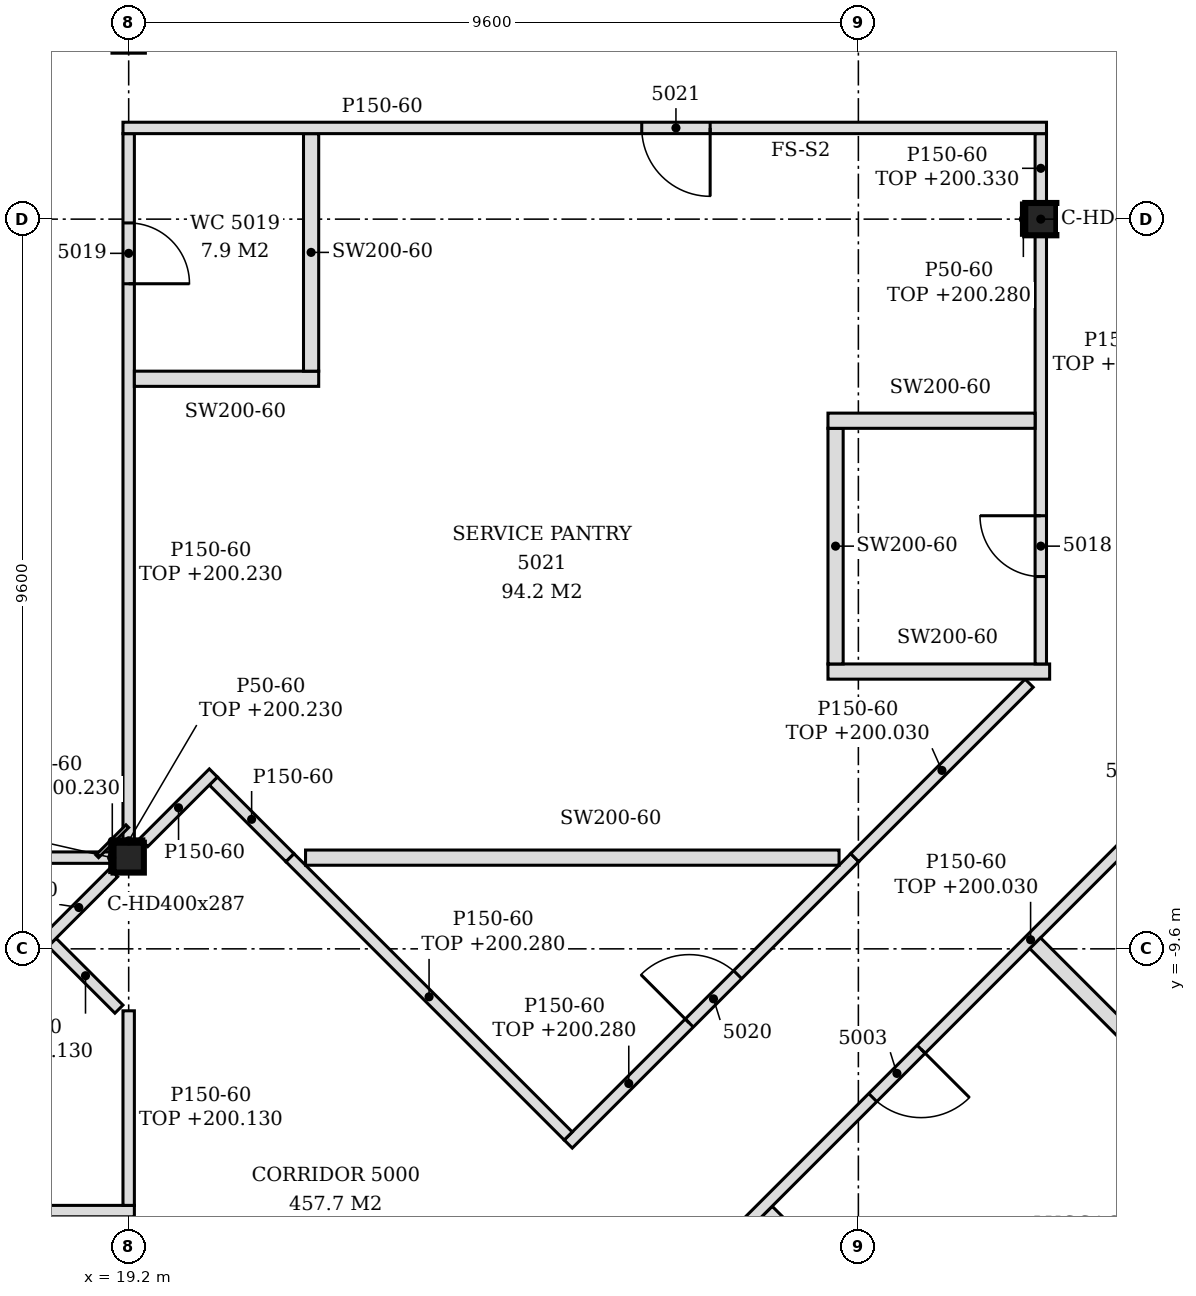
"""IFC4 building model, lengths in metres.
Left out: names, types, materials, properties, quantities, classifications, styles, units other than length and angle.
Written with IfcOpenShell. Run it as: python <this file> out.ifc"""

import sys

from ifc_helpers import new_model, si_unit, direction, frame, frame_2d, origin, origin_2d, place, context, subcontext, project, spatial, polyline, rectangle, i_section, outline, extrude, element, fill, save


model = new_model("IFC4")
c1 = context("Model", 3, precision=1e-05, world=origin(), true_north=direction((0.0, 1.0)))
c2 = subcontext(c1, "Body", "Model", "MODEL_VIEW")
j1 = project(units=[si_unit("LENGTHUNIT", "METRE"), si_unit("PLANEANGLEUNIT", "RADIAN")], contexts=[c1])
p1 = place(None, origin())
s1 = spatial("IfcSite", under=j1, at=p1, CompositionType="ELEMENT")
p2 = place(p1, origin())
s2 = spatial("IfcBuilding", under=s1, at=p2, CompositionType="ELEMENT")
p3 = place(p2, frame((0.0, 0.0, 197.4)))
s3 = spatial("IfcBuildingStorey", under=s2, at=p3, CompositionType="ELEMENT", Elevation=197.4)
p4 = place(p3, frame((19.2, -8.4, -0.15), z_axis=(0.0, 0.0, 1.0), x_axis=(1.0, 0.0, 0.0)))
e1 = element("IfcColumn", 1, at=p4, inside=s3, PredefinedType="COLUMN", context=c2, shape_type="SweptSolid", body=[
    extrude(i_section(OverallWidth=0.399, OverallDepth=0.393, WebThickness=0.023, FlangeThickness=0.037, FilletRadius=0.015, at=origin_2d()), origin(), (0.0, 0.0, 1.0), 3.6),
])
p5 = place(p3, frame((31.2, 0.0, -0.15), z_axis=(0.0, 0.0, 1.0), x_axis=(1.0, 0.0, 0.0)))
e2 = element("IfcColumn", 2, at=p5, inside=s3, PredefinedType="COLUMN", context=c2, shape_type="SweptSolid", body=[
    extrude(i_section(OverallWidth=0.409, OverallDepth=0.425, WebThickness=0.033, FlangeThickness=0.052, FilletRadius=0.015, at=origin_2d()), origin(), (0.0, 0.0, 1.0), 3.6),
])
p6 = place(p3, frame((32.595, -18.056, 0.0), z_axis=(0.0, 0.0, 1.0), x_axis=(-0.707158570602, 0.707054987978, 0.0)))
e3 = element("IfcWall", 3, at=p6, inside=s3, PredefinedType="PARTITIONING", context=c2, shape_type="SweptSolid", body=[
    extrude(rectangle(XDim=7.071, YDim=0.2, at=frame_2d((3.535, 0.0))), origin(), (0.0, 0.0, 1.0), 2.63),
])
p7 = place(p3, frame((25.199, -15.347, 0.0), z_axis=(0.0, 0.0, 1.0), x_axis=(0.707106781187, 0.707106781187, 0.0)))
e4 = element("IfcWall", 4, at=p7, inside=s3, PredefinedType="PARTITIONING", context=c2, shape_type="SweptSolid", body=[
    extrude(rectangle(XDim=13.366, YDim=0.15, at=frame_2d((6.683, 0.0))), origin(), (0.0, 0.0, 1.0), 2.63),
])
p8 = place(p7, frame((1.134, 0.0, 0.0)))
e5 = element("IfcOpeningElement", 5, at=p8, cuts=e4, PredefinedType="OPENING", context=c2, shape_type="SweptSolid", body=[
    extrude(rectangle(XDim=0.9, YDim=2.1, at=frame_2d((0.45, 1.05))), frame((0.0, 0.085, 0.0), z_axis=(0.0, -1.0, 0.0), x_axis=(1.0, 0.0, 0.0)), (0.0, 0.0, 1.0), 0.17),
])
p9 = place(p7, frame((5.36, 0.0, 0.0)))
e6 = element("IfcOpeningElement", 6, at=p9, cuts=e4, PredefinedType="OPENING", context=c2, shape_type="SweptSolid", body=[
    extrude(rectangle(XDim=0.9, YDim=2.1, at=frame_2d((0.45, 1.05))), frame((0.0, 0.085, 0.0), z_axis=(0.0, -1.0, 0.0), x_axis=(1.0, 0.0, 0.0)), (0.0, 0.0, 1.0), 0.17),
])
p10 = place(p7, frame((10.334, 0.0, 0.0)))
e7 = element("IfcOpeningElement", 7, at=p10, cuts=e4, PredefinedType="OPENING", context=c2, shape_type="SweptSolid", body=[
    extrude(rectangle(XDim=0.9, YDim=2.1, at=frame_2d((0.45, 1.05))), frame((0.0, 0.085, 0.0), z_axis=(0.0, -1.0, 0.0), x_axis=(1.0, 0.0, 0.0)), (0.0, 0.0, 1.0), 0.17),
])
p11 = place(p3, frame((36.793, -15.193, 0.0), z_axis=(0.0, 0.0, 1.0), x_axis=(-0.707091550515, 0.70712201153, 0.0)))
e8 = element("IfcWall", 8, at=p11, inside=s3, PredefinedType="PARTITIONING", context=c2, shape_type="SweptSolid", body=[
    extrude(rectangle(XDim=8.015, YDim=0.2, at=frame_2d((4.007, 0.0))), origin(), (0.0, 0.0, 1.0), 2.63),
])
p12 = place(p3, frame((2.325, -13.05, 0.0), z_axis=(0.0, 0.0, 1.0), x_axis=(1.0, 0.0, 0.0)))
e9 = element("IfcWall", 9, at=p12, inside=s3, PredefinedType="PARTITIONING", context=c2, shape_type="SweptSolid", body=[
    extrude(outline(polyline([(0.0, 0.0), (16.95, 0.0), (16.95, 2.73), (16.725, 2.73), (16.723, 3.45), (5.025, 3.45), (5.023, 2.73), (4.725, 2.73), (4.723, 3.45), (0.0, 3.45), (0.0, 0.0)])), frame((0.0, 0.075, 0.0), z_axis=(0.0, -1.0, 0.0), x_axis=(1.0, 0.0, 0.0)), (0.0, 0.0, 1.0), 0.15),
])
p13 = place(p12, frame((7.575, 0.0, 0.0)))
e10 = element("IfcOpeningElement", 10, at=p13, cuts=e9, PredefinedType="OPENING", context=c2, shape_type="SweptSolid", body=[
    extrude(rectangle(XDim=1.8, YDim=2.1, at=frame_2d((0.9, 1.05))), frame((0.0, 0.085, 0.0), z_axis=(0.0, -1.0, 0.0), x_axis=(1.0, 0.0, 0.0)), (0.0, 0.0, 1.0), 0.17),
])
p14 = place(p3, frame((19.2, -12.975, 0.0), z_axis=(0.0, 0.0, 1.0), x_axis=(0.0, 1.0, 0.0)))
e11 = element("IfcWall", 11, at=p14, inside=s3, PredefinedType="PARTITIONING", context=c2, shape_type="SweptSolid", body=[
    extrude(rectangle(XDim=2.56, YDim=0.15, at=frame_2d((1.28, 0.0))), origin(), (0.0, 0.0, 1.0), 2.73),
])
p15 = place(p3, frame((24.983, -12.168, 0.0), z_axis=(0.0, 0.0, 1.0), x_axis=(0.707198393128, 0.707015157374, 0.0)))
e12 = element("IfcWall", 12, at=p15, inside=s3, PredefinedType="PARTITIONING", context=c2, shape_type="SweptSolid", body=[
    extrude(rectangle(XDim=5.33, YDim=0.15, at=frame_2d((2.665, 0.0))), origin(), (0.0, 0.0, 1.0), 2.88),
])
p16 = place(p15, frame((2.252, 0.0, 0.0)))
e13 = element("IfcOpeningElement", 13, at=p16, cuts=e12, PredefinedType="OPENING", context=c2, shape_type="SweptSolid", body=[
    extrude(rectangle(XDim=0.9, YDim=2.1, at=frame_2d((0.45, 1.05))), frame((0.0, 0.085, 0.0), z_axis=(0.0, -1.0, 0.0), x_axis=(1.0, 0.0, 0.0)), (0.0, 0.0, 1.0), 0.17),
])
p17 = place(p3, frame((24.983, -12.062, 0.0), z_axis=(0.0, 0.0, 1.0), x_axis=(-0.707083209782, 0.707130351805, 0.0)))
e14 = element("IfcWall", 14, at=p17, inside=s3, PredefinedType="PARTITIONING", context=c2, shape_type="SweptSolid", body=[
    extrude(rectangle(XDim=5.179, YDim=0.15, at=frame_2d((2.589, 0.0))), origin(), (0.0, 0.0, 1.0), 2.88),
])
p18 = place(p3, frame((19.072, -10.393, 0.0), z_axis=(0.0, 0.0, 1.0), x_axis=(-0.70740114323, 0.706812296552, 0.0)))
e15 = element("IfcWall", 15, at=p18, inside=s3, PredefinedType="PARTITIONING", context=c2, shape_type="SweptSolid", body=[
    extrude(rectangle(XDim=1.244, YDim=0.15, at=frame_2d((0.622, 0.0))), origin(), (0.0, 0.0, 1.0), 2.73),
])
p19 = place(p3, frame((18.086, -9.514, 0.0), z_axis=(0.0, 0.0, 1.0), x_axis=(0.707106781187, 0.707106781187, 0.0)))
e16 = element("IfcWall", 16, at=p19, inside=s3, PredefinedType="PARTITIONING", context=c2, shape_type="SweptSolid", body=[
    extrude(rectangle(XDim=1.295, YDim=0.15, at=frame_2d((0.648, 0.0))), origin(), (0.0, 0.0, 1.0), 3.45),
])
p20 = place(p3, frame((7.399, -8.4, 0.0), z_axis=(0.0, 0.0, 1.0), x_axis=(1.0, 0.0, 0.0)))
e17 = element("IfcWall", 17, at=p20, inside=s3, PredefinedType="PARTITIONING", context=c2, shape_type="SweptSolid", body=[
    extrude(rectangle(XDim=11.601, YDim=0.15, at=frame_2d((5.801, 0.0))), origin(), (0.0, 0.0, 1.0), 2.83),
])
p21 = place(p3, frame((21.321, -8.4, 0.0), z_axis=(0.0, 0.0, 1.0), x_axis=(-0.706763941595, 0.707449454633, 0.0)))
e18 = element("IfcWall", 18, at=p21, inside=s3, PredefinedType="PARTITIONING", context=c2, shape_type="SweptSolid", body=[
    extrude(rectangle(XDim=1.425, YDim=0.15, at=frame_2d((0.712, 0.0))), origin(), (0.0, 0.0, 1.0), 3.45),
])
p22 = place(p3, frame((21.527, -8.4, 0.0), z_axis=(0.0, 0.0, 1.0), x_axis=(1.0, 0.0, 0.0)))
e19 = element("IfcWall", 19, at=p22, inside=s3, PredefinedType="PARTITIONING", context=c2, shape_type="SweptSolid", body=[
    extrude(rectangle(XDim=7.019, YDim=0.2, at=frame_2d((3.51, 0.0))), origin(), (0.0, 0.0, 1.0), 3.45),
])
p23 = place(p3, frame((28.752, -8.4, 0.0), z_axis=(0.0, 0.0, 1.0), x_axis=(0.707144390249, 0.707069170124, 0.0)))
e20 = element("IfcWall", 20, at=p23, inside=s3, PredefinedType="PARTITIONING", context=c2, shape_type="SweptSolid", body=[
    extrude(rectangle(XDim=3.246, YDim=0.15, at=frame_2d((1.623, 0.0))), origin(), (0.0, 0.0, 1.0), 2.63),
])
p24 = place(p3, frame((19.2, -8.204, 0.0), z_axis=(0.0, 0.0, 1.0), x_axis=(0.0, 1.0, 0.0)))
e21 = element("IfcWall", 21, at=p24, inside=s3, PredefinedType="PARTITIONING", context=c2, shape_type="SweptSolid", body=[
    extrude(rectangle(XDim=9.329, YDim=0.15, at=frame_2d((4.664, 0.0))), origin(), (0.0, 0.0, 1.0), 2.83),
])
p25 = place(p24, frame((7.354, 0.0, 0.0)))
e22 = element("IfcOpeningElement", 22, at=p25, cuts=e21, PredefinedType="OPENING", context=c2, shape_type="SweptSolid", body=[
    extrude(rectangle(XDim=0.8, YDim=2.1, at=frame_2d((0.4, 1.05))), frame((0.0, 0.085, 0.0), z_axis=(0.0, -1.0, 0.0), x_axis=(1.0, 0.0, 0.0)), (0.0, 0.0, 1.0), 0.17),
])
p26 = place(p3, frame((19.398, -8.202, 0.0), z_axis=(0.0, 0.0, 1.0), x_axis=(0.707200993001, 0.707012556818, 0.0)))
e23 = element("IfcWall", 23, at=p26, inside=s3, PredefinedType="PARTITIONING", context=c2, shape_type="SweptSolid", body=[
    extrude(rectangle(XDim=1.296, YDim=0.15, at=frame_2d((0.648, 0.0))), origin(), (0.0, 0.0, 1.0), 3.45),
])
p27 = place(p3, frame((28.4, -5.952, 0.0), z_axis=(0.0, 0.0, 1.0), x_axis=(1.0, 0.0, 0.0)))
e24 = element("IfcWall", 24, at=p27, inside=s3, PredefinedType="PARTITIONING", context=c2, shape_type="SweptSolid", body=[
    extrude(outline(polyline([(0.0, 0.0), (2.917, 0.0), (2.917, 2.63), (2.65, 2.63), (2.648, 3.45), (0.0, 3.45), (0.0, 0.0)])), frame((0.0, 0.1, 0.0), z_axis=(0.0, -1.0, 0.0), x_axis=(1.0, 0.0, 0.0)), (0.0, 0.0, 1.0), 0.2),
])
p28 = place(p3, frame((28.5, -5.852, 0.0), z_axis=(0.0, 0.0, 1.0), x_axis=(0.0, 1.0, 0.0)))
e25 = element("IfcWall", 25, at=p28, inside=s3, PredefinedType="PARTITIONING", context=c2, shape_type="SweptSolid", body=[
    extrude(outline(polyline([(0.0, 0.0), (3.1, 0.0), (3.1, 3.45), (1.157, 3.45), (1.155, 2.88), (0.947, 2.88), (0.945, 3.45), (0.0, 3.45), (0.0, 0.0)])), frame((0.0, 0.1, 0.0), z_axis=(0.0, -1.0, 0.0), x_axis=(1.0, 0.0, 0.0)), (0.0, 0.0, 1.0), 0.2),
])
p29 = place(p3, frame((31.2, -5.852, 0.0), z_axis=(0.0, 0.0, 1.0), x_axis=(0.0, 1.0, 0.0)))
e26 = element("IfcWall", 26, at=p29, inside=s3, PredefinedType="PARTITIONING", context=c2, shape_type="SweptSolid", body=[
    extrude(rectangle(XDim=5.64, YDim=0.15, at=frame_2d((2.82, 0.0))), origin(), (0.0, 0.0, 1.0), 2.63),
])
p30 = place(p29, frame((1.15, 0.0, 0.0)))
e27 = element("IfcOpeningElement", 27, at=p30, cuts=e26, PredefinedType="OPENING", context=c2, shape_type="SweptSolid", body=[
    extrude(rectangle(XDim=0.8, YDim=2.1, at=frame_2d((0.4, 1.05))), frame((0.0, 0.085, 0.0), z_axis=(0.0, -1.0, 0.0), x_axis=(1.0, 0.0, 0.0)), (0.0, 0.0, 1.0), 0.17),
])
p31 = place(p3, frame((28.4, -2.652, 0.0), z_axis=(0.0, 0.0, 1.0), x_axis=(1.0, 0.0, 0.0)))
e28 = element("IfcWall", 28, at=p31, inside=s3, PredefinedType="PARTITIONING", context=c2, shape_type="SweptSolid", body=[
    extrude(outline(polyline([(0.0, 0.0), (2.725, 0.0), (2.725, 2.63), (2.65, 2.63), (2.648, 3.45), (0.0, 3.45), (0.0, 0.0)])), frame((0.0, 0.1, 0.0), z_axis=(0.0, -1.0, 0.0), x_axis=(1.0, 0.0, 0.0)), (0.0, 0.0, 1.0), 0.2),
])
p32 = place(p3, frame((19.275, -2.1, 0.0), z_axis=(0.0, 0.0, 1.0), x_axis=(1.0, 0.0, 0.0)))
e29 = element("IfcWall", 29, at=p32, inside=s3, PredefinedType="PARTITIONING", context=c2, shape_type="SweptSolid", body=[
    extrude(outline(polyline([(0.0, 0.0), (2.425, 0.0), (2.425, 3.45), (0.075, 3.45), (0.073, 2.83), (0.0, 2.83), (0.0, 0.0)])), frame((0.0, 0.1, 0.0), z_axis=(0.0, -1.0, 0.0), x_axis=(1.0, 0.0, 0.0)), (0.0, 0.0, 1.0), 0.2),
])
p33 = place(p3, frame((21.6, -2.0, 0.0), z_axis=(0.0, 0.0, 1.0), x_axis=(0.0, 1.0, 0.0)))
e30 = element("IfcWall", 30, at=p33, inside=s3, PredefinedType="PARTITIONING", context=c2, shape_type="SweptSolid", body=[
    extrude(outline(polyline([(0.0, 0.0), (3.125, 0.0), (3.125, 3.45), (2.105, 3.45), (2.103, 2.88), (1.895, 2.88), (1.893, 3.45), (0.0, 3.45), (0.0, 0.0)])), frame((0.0, 0.1, 0.0), z_axis=(0.0, -1.0, 0.0), x_axis=(1.0, 0.0, 0.0)), (0.0, 0.0, 1.0), 0.2),
])
p34 = place(p3, frame((31.2, 0.212, 0.0), z_axis=(0.0, 0.0, 1.0), x_axis=(0.0, 1.0, 0.0)))
e31 = element("IfcWall", 31, at=p34, inside=s3, PredefinedType="PARTITIONING", context=c2, shape_type="SweptSolid", body=[
    extrude(rectangle(XDim=0.913, YDim=0.15, at=frame_2d((0.456, 0.0))), origin(), (0.0, 0.0, 1.0), 2.93),
])
p35 = place(p3, frame((19.125, 1.2, 0.0), z_axis=(0.0, 0.0, 1.0), x_axis=(1.0, 0.0, 0.0)))
e32 = element("IfcWall", 32, at=p35, inside=s3, PredefinedType="PARTITIONING", context=c2, shape_type="SweptSolid", body=[
    extrude(outline(polyline([(0.0, 0.0), (12.15, 0.0), (12.15, 2.93), (11.925, 2.93), (11.923, 3.45), (0.225, 3.45), (0.223, 2.83), (0.0, 2.83), (0.0, 0.0)])), frame((0.0, 0.075, 0.0), z_axis=(0.0, -1.0, 0.0), x_axis=(1.0, 0.0, 0.0)), (0.0, 0.0, 1.0), 0.15),
])
p36 = place(p35, frame((6.825, 0.0, 0.0)))
e33 = element("IfcOpeningElement", 33, at=p36, cuts=e32, PredefinedType="OPENING", context=c2, shape_type="SweptSolid", body=[
    extrude(rectangle(XDim=0.9, YDim=2.1, at=frame_2d((0.45, 1.05))), frame((0.0, 0.085, 0.0), z_axis=(0.0, -1.0, 0.0), x_axis=(1.0, 0.0, 0.0)), (0.0, 0.0, 1.0), 0.17),
])
p37 = place(p3, frame((34.447, 1.347, 0.0), z_axis=(0.0, 0.0, 1.0), x_axis=(-0.707106781187, 0.707106781187, 0.0)))
e34 = element("IfcWall", 34, at=p37, inside=s3, PredefinedType="PARTITIONING", context=c2, shape_type="SweptSolid", body=[
    extrude(rectangle(XDim=16.582, YDim=0.15, at=frame_2d((8.291, 0.0))), origin(), (0.0, 0.0, 1.0), 2.88),
])
p38 = place(p37, frame((4.726, 0.0, 0.0)))
e35 = element("IfcOpeningElement", 35, at=p38, cuts=e34, PredefinedType="OPENING", context=c2, shape_type="SweptSolid", body=[
    extrude(rectangle(XDim=0.9, YDim=2.1, at=frame_2d((0.45, 1.05))), frame((0.0, 0.085, 0.0), z_axis=(0.0, -1.0, 0.0), x_axis=(1.0, 0.0, 0.0)), (0.0, 0.0, 1.0), 0.17),
])
p39 = place(p37, frame((10.231, 0.0, 0.0)))
e36 = element("IfcOpeningElement", 36, at=p39, cuts=e34, PredefinedType="OPENING", context=c2, shape_type="SweptSolid", body=[
    extrude(rectangle(XDim=0.9, YDim=2.1, at=frame_2d((0.45, 1.05))), frame((0.0, 0.085, 0.0), z_axis=(0.0, -1.0, 0.0), x_axis=(1.0, 0.0, 0.0)), (0.0, 0.0, 1.0), 0.17),
])
p40 = place(p3, frame((18.786, -8.382, 0.0), z_axis=(0.0, 0.0, 1.0), x_axis=(0.707106781187, 0.707106781187, 0.0)))
e37 = element("IfcWall", 37, at=p40, inside=s3, PredefinedType="PARTITIONING", context=c2, shape_type="SweptSolid", body=[
    extrude(rectangle(XDim=0.56, YDim=0.05, at=frame_2d((0.28, 0.0))), origin(), (0.0, 0.0, 1.0), 2.83),
])
p41 = place(p3, frame((19.0, -8.178, 0.0), z_axis=(0.0, 0.0, 1.0), x_axis=(1.0, 0.0, 0.0)))
e38 = element("IfcWall", 38, at=p41, inside=s3, PredefinedType="PARTITIONING", context=c2, shape_type="SweptSolid", body=[
    extrude(rectangle(XDim=0.399, YDim=0.05, at=frame_2d((0.199, 0.0))), origin(), (0.0, 0.0, 1.0), 2.83),
])
p42 = place(p3, frame((18.976, -8.596, 0.0), z_axis=(0.0, 0.0, 1.0), x_axis=(0.0, 1.0, 0.0)))
e39 = element("IfcWall", 39, at=p42, inside=s3, PredefinedType="PARTITIONING", context=c2, shape_type="SweptSolid", body=[
    extrude(rectangle(XDim=0.393, YDim=0.05, at=frame_2d((0.196, 0.0))), origin(), (0.0, 0.0, 1.0), 2.83),
])
p43 = place(p3, frame((30.97, -0.212, 0.0), z_axis=(0.0, 0.0, 1.0), x_axis=(0.0, 1.0, 0.0)))
e40 = element("IfcWall", 40, at=p43, inside=s3, PredefinedType="PARTITIONING", context=c2, shape_type="SweptSolid", body=[
    extrude(rectangle(XDim=0.425, YDim=0.05, at=frame_2d((0.212, 0.0))), origin(), (0.0, 0.0, 1.0), 2.88),
])
p44 = place(p9, frame((0.9, 0.0, 0.0), z_axis=(0.0, 0.0, 1.0), x_axis=(-1.0, 0.0, 0.0)))
e41 = element("IfcDoor", 41, at=p44, inside=s3, OperationType="SINGLE_SWING_LEFT", PredefinedType="DOOR", context=c2, shape_type="SweptSolid", body=[
    extrude(rectangle(XDim=0.9, YDim=2.1, at=frame_2d((0.45, 1.05))), frame((0.0, 0.025, 0.0), z_axis=(0.0, -1.0, 0.0), x_axis=(1.0, 0.0, 0.0)), (0.0, 0.0, 1.0), 0.05),
])
fill(e6, e41)
p45 = place(p30, origin())
e42 = element("IfcDoor", 42, at=p45, inside=s3, OperationType="SINGLE_SWING_RIGHT", PredefinedType="DOOR", context=c2, shape_type="SweptSolid", body=[
    extrude(rectangle(XDim=0.8, YDim=2.1, at=frame_2d((0.4, 1.05))), frame((0.0, 0.025, 0.0), z_axis=(0.0, -1.0, 0.0), x_axis=(1.0, 0.0, 0.0)), (0.0, 0.0, 1.0), 0.05),
])
fill(e27, e42)
p46 = place(p25, frame((0.8, 0.0, 0.0), z_axis=(0.0, 0.0, 1.0), x_axis=(-1.0, 0.0, 0.0)))
e43 = element("IfcDoor", 43, at=p46, inside=s3, OperationType="SINGLE_SWING_RIGHT", PredefinedType="DOOR", context=c2, shape_type="SweptSolid", body=[
    extrude(rectangle(XDim=0.8, YDim=2.1, at=frame_2d((0.4, 1.05))), frame((0.0, 0.025, 0.0), z_axis=(0.0, -1.0, 0.0), x_axis=(1.0, 0.0, 0.0)), (0.0, 0.0, 1.0), 0.05),
])
fill(e22, e43)
p47 = place(p16, origin())
e44 = element("IfcDoor", 44, at=p47, inside=s3, OperationType="SINGLE_SWING_LEFT", PredefinedType="DOOR", context=c2, shape_type="SweptSolid", body=[
    extrude(rectangle(XDim=0.9, YDim=2.1, at=frame_2d((0.45, 1.05))), frame((0.0, 0.025, 0.0), z_axis=(0.0, -1.0, 0.0), x_axis=(1.0, 0.0, 0.0)), (0.0, 0.0, 1.0), 0.05),
])
fill(e13, e44)
p48 = place(p36, frame((0.9, 0.0, 0.0), z_axis=(0.0, 0.0, 1.0), x_axis=(-1.0, 0.0, 0.0)))
e45 = element("IfcDoor", 45, at=p48, inside=s3, OperationType="SINGLE_SWING_LEFT", PredefinedType="DOOR", context=c2, shape_type="SweptSolid", body=[
    extrude(rectangle(XDim=0.9, YDim=2.1, at=frame_2d((0.45, 1.05))), frame((0.0, 0.025, 0.0), z_axis=(0.0, -1.0, 0.0), x_axis=(1.0, 0.0, 0.0)), (0.0, 0.0, 1.0), 0.05),
])
fill(e33, e45)
save(model, sys.argv[1])
